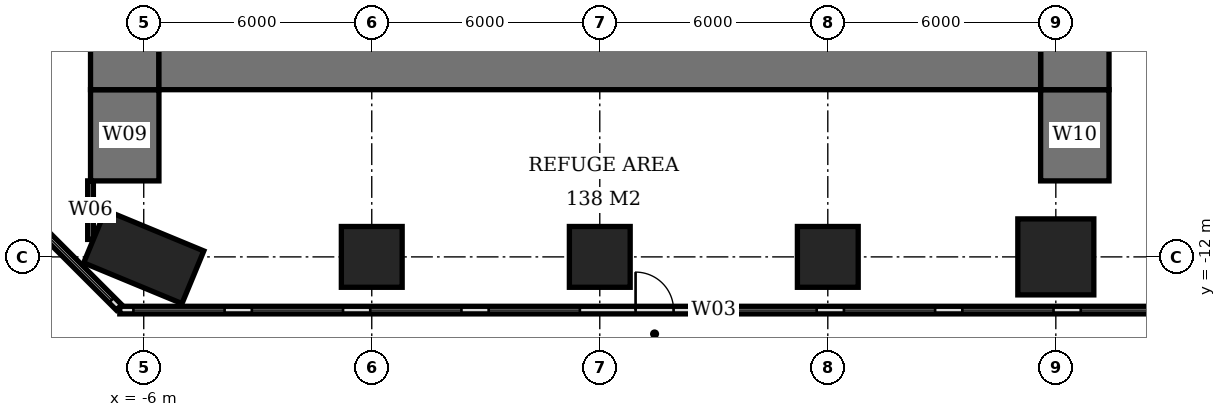
"""IFC4 building model, lengths in metres.
Left out: names, types, materials, properties, quantities, classifications, styles, units other than length and angle.
Written with IfcOpenShell. Run it as: python <this file> out.ifc"""

import sys

from ifc_helpers import new_model, si_unit, direction, frame, frame_2d, origin, origin_2d, place, context, subcontext, project, spatial, rectangle, extrude, element, fill, save


model = new_model("IFC4")
c1 = context("Model", 3, precision=1e-05, world=origin(), true_north=direction((0.0, 1.0)))
c2 = subcontext(c1, "Body", "Model", "MODEL_VIEW")
j1 = project(units=[si_unit("LENGTHUNIT", "METRE"), si_unit("PLANEANGLEUNIT", "RADIAN")], contexts=[c1])
p1 = place(None, origin())
s1 = spatial("IfcSite", under=j1, at=p1, CompositionType="ELEMENT")
p2 = place(p1, origin())
s2 = spatial("IfcBuilding", under=s1, at=p2, CompositionType="ELEMENT")
p3 = place(p2, frame((0.0, 0.0, 239.6)))
s3 = spatial("IfcBuildingStorey", under=s2, at=p3, CompositionType="ELEMENT", Elevation=239.6)
p4 = place(p3, frame((-6.0, -12.0, 0.0), z_axis=(0.0, 0.0, 1.0), x_axis=(-0.923879532511, 0.382683432365, 0.0)))
e1 = element("IfcColumn", 1, at=p4, inside=s3, PredefinedType="COLUMN", context=c2, shape_type="SweptSolid", body=[
    extrude(rectangle(XDim=2.8, YDim=1.5, at=origin_2d()), origin(), (0.0, 0.0, 1.0), 5.4),
])
for number, where, z_axis, x_axis in (
    (2, (0.0, -12.0, 0.0), (0.0, 0.0, 1.0), (1.0, 0.0, 0.0)),
    (3, (6.0, -12.0, 0.0), (0.0, 0.0, 1.0), (1.0, 0.0, 0.0)),
    (4, (12.0, -12.0, 0.0), (0.0, 0.0, 1.0), (1.0, 0.0, 0.0)),
):
    element("IfcColumn", number, at=place(p3, frame(where, z_axis=z_axis, x_axis=x_axis)), inside=s3, PredefinedType="COLUMN", context=c2, shape_type="SweptSolid", body=[
        extrude(rectangle(XDim=1.6, YDim=1.6, at=origin_2d()), origin(), (0.0, 0.0, 1.0), 5.4),
    ])
p5 = place(p3, frame((18.0, -12.0, 0.0), z_axis=(0.0, 0.0, 1.0), x_axis=(1.0, 0.0, 0.0)))
e5 = element("IfcColumn", 5, at=p5, inside=s3, PredefinedType="COLUMN", context=c2, shape_type="SweptSolid", body=[
    extrude(rectangle(XDim=2.0, YDim=2.0, at=origin_2d()), origin(), (0.0, 0.0, 1.0), 5.4),
])
p6 = place(p3, frame((-5.6, -6.6, 0.0), z_axis=(0.0, 0.0, 1.0), x_axis=(1.0, 0.0, 0.0)))
e6 = element("IfcWall", 6, at=p6, inside=s3, PredefinedType="SHEAR", context=c2, shape_type="SweptSolid", body=[
    extrude(rectangle(XDim=23.2, YDim=2.0, at=frame_2d((11.6, 0.0))), origin(), (0.0, 0.0, 1.0), 5.4),
])
p7 = place(p3, frame((-6.5, -7.6, 0.0), z_axis=(0.0, 0.0, 1.0), x_axis=(0.0, 1.0, 0.0)))
e7 = element("IfcWall", 7, at=p7, inside=s3, PredefinedType="SHEAR", context=c2, shape_type="SweptSolid", body=[
    extrude(rectangle(XDim=21.2, YDim=1.8, at=frame_2d((10.6, 0.0))), origin(), (0.0, 0.0, 1.0), 5.4),
])
p8 = place(p7, frame((7.8, 0.0, 0.0)))
e8 = element("IfcOpeningElement", 8, at=p8, cuts=e7, PredefinedType="OPENING", context=c2, shape_type="SweptSolid", body=[
    extrude(rectangle(XDim=1.8, YDim=2.4, at=frame_2d((0.9, 1.2))), frame((0.0, 0.91, 0.0), z_axis=(0.0, -1.0, 0.0), x_axis=(1.0, 0.0, 0.0)), (0.0, 0.0, 1.0), 1.82),
])
p9 = place(p3, frame((18.5, -7.6, 0.0), z_axis=(0.0, 0.0, 1.0), x_axis=(0.0, 1.0, 0.0)))
e9 = element("IfcWall", 9, at=p9, inside=s3, PredefinedType="SHEAR", context=c2, shape_type="SweptSolid", body=[
    extrude(rectangle(XDim=21.2, YDim=1.8, at=frame_2d((10.6, 0.0))), origin(), (0.0, 0.0, 1.0), 5.4),
])
p10 = place(p9, frame((9.2, 0.0, 0.0)))
e10 = element("IfcOpeningElement", 10, at=p10, cuts=e9, PredefinedType="OPENING", context=c2, shape_type="SweptSolid", body=[
    extrude(rectangle(XDim=1.8, YDim=2.4, at=frame_2d((0.9, 1.2))), frame((0.0, 0.91, 0.0), z_axis=(0.0, -1.0, 0.0), x_axis=(1.0, 0.0, 0.0)), (0.0, 0.0, 1.0), 1.82),
])
for number, where, z_axis, x_axis in (
    (11, (-6.5, -10.0, 0.0), (0.0, 0.0, 1.0), (0.0, 1.0, 0.0)),
    (12, (18.5, -10.0, 0.0), (0.0, 0.0, 1.0), (0.0, 1.0, 0.0)),
):
    element("IfcWall", number, at=place(p3, frame(where, z_axis=z_axis, x_axis=x_axis)), inside=s3, PredefinedType="SHEAR", context=c2, shape_type="SweptSolid", body=[
        extrude(rectangle(XDim=2.4, YDim=1.8, at=frame_2d((1.2, 0.0))), origin(), (0.0, 0.0, 1.0), 5.4),
    ])
p11 = place(p3, frame((-6.63, -13.4, 0.0), z_axis=(0.0, 0.0, 1.0), x_axis=(1.0, 0.0, 0.0)))
e13 = element("IfcWall", 13, at=p11, inside=s3, PredefinedType="USERDEFINED", context=c2, shape_type="SweptSolid", body=[
    extrude(rectangle(XDim=31.26, YDim=0.2, at=frame_2d((15.63, 0.0))), origin(), (0.0, 0.0, 1.0), 5.4),
])
p12 = place(p11, frame((0.358, 0.0, 0.6)))
e14 = element("IfcOpeningElement", 14, at=p12, cuts=e13, PredefinedType="OPENING", context=c2, shape_type="SweptSolid", body=[
    extrude(rectangle(XDim=2.4, YDim=3.0, at=frame_2d((1.2, 1.5))), frame((0.0, 0.11, 0.0), z_axis=(0.0, -1.0, 0.0), x_axis=(1.0, 0.0, 0.0)), (0.0, 0.0, 1.0), 0.22),
])
p13 = place(p11, frame((3.474, 0.0, 0.6)))
e15 = element("IfcOpeningElement", 15, at=p13, cuts=e13, PredefinedType="OPENING", context=c2, shape_type="SweptSolid", body=[
    extrude(rectangle(XDim=2.4, YDim=3.0, at=frame_2d((1.2, 1.5))), frame((0.0, 0.11, 0.0), z_axis=(0.0, -1.0, 0.0), x_axis=(1.0, 0.0, 0.0)), (0.0, 0.0, 1.0), 0.22),
])
p14 = place(p11, frame((6.59, 0.0, 0.6)))
e16 = element("IfcOpeningElement", 16, at=p14, cuts=e13, PredefinedType="OPENING", context=c2, shape_type="SweptSolid", body=[
    extrude(rectangle(XDim=2.4, YDim=3.0, at=frame_2d((1.2, 1.5))), frame((0.0, 0.11, 0.0), z_axis=(0.0, -1.0, 0.0), x_axis=(1.0, 0.0, 0.0)), (0.0, 0.0, 1.0), 0.22),
])
p15 = place(p11, frame((9.706, 0.0, 0.6)))
e17 = element("IfcOpeningElement", 17, at=p15, cuts=e13, PredefinedType="OPENING", context=c2, shape_type="SweptSolid", body=[
    extrude(rectangle(XDim=2.4, YDim=3.0, at=frame_2d((1.2, 1.5))), frame((0.0, 0.11, 0.0), z_axis=(0.0, -1.0, 0.0), x_axis=(1.0, 0.0, 0.0)), (0.0, 0.0, 1.0), 0.22),
])
p16 = place(p11, frame((13.572, 0.0, 0.0)))
e18 = element("IfcOpeningElement", 18, at=p16, cuts=e13, PredefinedType="OPENING", context=c2, shape_type="SweptSolid", body=[
    extrude(rectangle(XDim=1.0, YDim=2.1, at=frame_2d((0.5, 1.05))), frame((0.0, 0.11, 0.0), z_axis=(0.0, -1.0, 0.0), x_axis=(1.0, 0.0, 0.0)), (0.0, 0.0, 1.0), 0.22),
])
p17 = place(p11, frame((15.938, 0.0, 0.6)))
e19 = element("IfcOpeningElement", 19, at=p17, cuts=e13, PredefinedType="OPENING", context=c2, shape_type="SweptSolid", body=[
    extrude(rectangle(XDim=2.4, YDim=3.0, at=frame_2d((1.2, 1.5))), frame((0.0, 0.11, 0.0), z_axis=(0.0, -1.0, 0.0), x_axis=(1.0, 0.0, 0.0)), (0.0, 0.0, 1.0), 0.22),
])
p18 = place(p11, frame((19.054, 0.0, 0.6)))
e20 = element("IfcOpeningElement", 20, at=p18, cuts=e13, PredefinedType="OPENING", context=c2, shape_type="SweptSolid", body=[
    extrude(rectangle(XDim=2.4, YDim=3.0, at=frame_2d((1.2, 1.5))), frame((0.0, 0.11, 0.0), z_axis=(0.0, -1.0, 0.0), x_axis=(1.0, 0.0, 0.0)), (0.0, 0.0, 1.0), 0.22),
])
p19 = place(p11, frame((22.17, 0.0, 0.6)))
e21 = element("IfcOpeningElement", 21, at=p19, cuts=e13, PredefinedType="OPENING", context=c2, shape_type="SweptSolid", body=[
    extrude(rectangle(XDim=2.4, YDim=3.0, at=frame_2d((1.2, 1.5))), frame((0.0, 0.11, 0.0), z_axis=(0.0, -1.0, 0.0), x_axis=(1.0, 0.0, 0.0)), (0.0, 0.0, 1.0), 0.22),
])
p20 = place(p11, frame((25.286, 0.0, 0.6)))
e22 = element("IfcOpeningElement", 22, at=p20, cuts=e13, PredefinedType="OPENING", context=c2, shape_type="SweptSolid", body=[
    extrude(rectangle(XDim=2.4, YDim=3.0, at=frame_2d((1.2, 1.5))), frame((0.0, 0.11, 0.0), z_axis=(0.0, -1.0, 0.0), x_axis=(1.0, 0.0, 0.0)), (0.0, 0.0, 1.0), 0.22),
])
p21 = place(p11, frame((28.402, 0.0, 0.6)))
e23 = element("IfcOpeningElement", 23, at=p21, cuts=e13, PredefinedType="OPENING", context=c2, shape_type="SweptSolid", body=[
    extrude(rectangle(XDim=2.4, YDim=3.0, at=frame_2d((1.2, 1.5))), frame((0.0, 0.11, 0.0), z_axis=(0.0, -1.0, 0.0), x_axis=(1.0, 0.0, 0.0)), (0.0, 0.0, 1.0), 0.22),
])
p22 = place(p3, frame((-13.329, -6.651, 0.0), z_axis=(0.0, 0.0, 1.0), x_axis=(0.707106781187, -0.707106781187, 0.0)))
e24 = element("IfcWall", 24, at=p22, inside=s3, PredefinedType="USERDEFINED", context=c2, shape_type="SweptSolid", body=[
    extrude(rectangle(XDim=9.445, YDim=0.2, at=frame_2d((4.723, 0.0))), origin(), (0.0, 0.0, 1.0), 5.4),
])
p23 = place(p22, frame((0.274, 0.0, 0.6)))
e25 = element("IfcOpeningElement", 25, at=p23, cuts=e24, PredefinedType="OPENING", context=c2, shape_type="SweptSolid", body=[
    extrude(rectangle(XDim=2.6, YDim=3.0, at=frame_2d((1.3, 1.5))), frame((0.0, 0.11, 0.0), z_axis=(0.0, -1.0, 0.0), x_axis=(1.0, 0.0, 0.0)), (0.0, 0.0, 1.0), 0.22),
])
p24 = place(p22, frame((3.423, 0.0, 0.6)))
e26 = element("IfcOpeningElement", 26, at=p24, cuts=e24, PredefinedType="OPENING", context=c2, shape_type="SweptSolid", body=[
    extrude(rectangle(XDim=2.6, YDim=3.0, at=frame_2d((1.3, 1.5))), frame((0.0, 0.11, 0.0), z_axis=(0.0, -1.0, 0.0), x_axis=(1.0, 0.0, 0.0)), (0.0, 0.0, 1.0), 0.22),
])
p25 = place(p22, frame((6.571, 0.0, 0.6)))
e27 = element("IfcOpeningElement", 27, at=p25, cuts=e24, PredefinedType="OPENING", context=c2, shape_type="SweptSolid", body=[
    extrude(rectangle(XDim=2.6, YDim=3.0, at=frame_2d((1.3, 1.5))), frame((0.0, 0.11, 0.0), z_axis=(0.0, -1.0, 0.0), x_axis=(1.0, 0.0, 0.0)), (0.0, 0.0, 1.0), 0.22),
])
p26 = place(p3, frame((-7.4, -11.541, 0.0), z_axis=(0.0, 0.0, 1.0), x_axis=(0.0, 1.0, 0.0)))
e28 = element("IfcWall", 28, at=p26, inside=s3, PredefinedType="PARTITIONING", context=c2, shape_type="SweptSolid", body=[
    extrude(rectangle(XDim=1.541, YDim=0.15, at=frame_2d((0.77, 0.0))), origin(), (0.0, 0.0, 1.0), 5.15),
])
p27 = place(p12, origin())
e29 = element("IfcWindow", 29, at=p27, inside=s3, PartitioningType="SINGLE_PANEL", PredefinedType="USERDEFINED", context=c2, shape_type="SweptSolid", body=[
    extrude(rectangle(XDim=2.4, YDim=3.0, at=frame_2d((1.2, 1.5))), frame((0.0, 0.03, 0.0), z_axis=(0.0, -1.0, 0.0), x_axis=(1.0, 0.0, 0.0)), (0.0, 0.0, 1.0), 0.06),
])
fill(e14, e29)
p28 = place(p13, origin())
e30 = element("IfcWindow", 30, at=p28, inside=s3, PartitioningType="SINGLE_PANEL", PredefinedType="USERDEFINED", context=c2, shape_type="SweptSolid", body=[
    extrude(rectangle(XDim=2.4, YDim=3.0, at=frame_2d((1.2, 1.5))), frame((0.0, 0.03, 0.0), z_axis=(0.0, -1.0, 0.0), x_axis=(1.0, 0.0, 0.0)), (0.0, 0.0, 1.0), 0.06),
])
fill(e15, e30)
p29 = place(p14, origin())
e31 = element("IfcWindow", 31, at=p29, inside=s3, PartitioningType="SINGLE_PANEL", PredefinedType="USERDEFINED", context=c2, shape_type="SweptSolid", body=[
    extrude(rectangle(XDim=2.4, YDim=3.0, at=frame_2d((1.2, 1.5))), frame((0.0, 0.03, 0.0), z_axis=(0.0, -1.0, 0.0), x_axis=(1.0, 0.0, 0.0)), (0.0, 0.0, 1.0), 0.06),
])
fill(e16, e31)
p30 = place(p15, origin())
e32 = element("IfcWindow", 32, at=p30, inside=s3, PartitioningType="SINGLE_PANEL", PredefinedType="USERDEFINED", context=c2, shape_type="SweptSolid", body=[
    extrude(rectangle(XDim=2.4, YDim=3.0, at=frame_2d((1.2, 1.5))), frame((0.0, 0.03, 0.0), z_axis=(0.0, -1.0, 0.0), x_axis=(1.0, 0.0, 0.0)), (0.0, 0.0, 1.0), 0.06),
])
fill(e17, e32)
p31 = place(p16, origin())
e33 = element("IfcDoor", 33, at=p31, inside=s3, OperationType="SINGLE_SWING_LEFT", PredefinedType="DOOR", context=c2, shape_type="SweptSolid", body=[
    extrude(rectangle(XDim=1.0, YDim=2.1, at=frame_2d((0.5, 1.05))), frame((0.0, 0.025, 0.0), z_axis=(0.0, -1.0, 0.0), x_axis=(1.0, 0.0, 0.0)), (0.0, 0.0, 1.0), 0.05),
])
fill(e18, e33)
p32 = place(p17, origin())
e34 = element("IfcWindow", 34, at=p32, inside=s3, PartitioningType="SINGLE_PANEL", PredefinedType="USERDEFINED", context=c2, shape_type="SweptSolid", body=[
    extrude(rectangle(XDim=2.4, YDim=3.0, at=frame_2d((1.2, 1.5))), frame((0.0, 0.03, 0.0), z_axis=(0.0, -1.0, 0.0), x_axis=(1.0, 0.0, 0.0)), (0.0, 0.0, 1.0), 0.06),
])
fill(e19, e34)
p33 = place(p18, origin())
e35 = element("IfcWindow", 35, at=p33, inside=s3, PartitioningType="SINGLE_PANEL", PredefinedType="USERDEFINED", context=c2, shape_type="SweptSolid", body=[
    extrude(rectangle(XDim=2.4, YDim=3.0, at=frame_2d((1.2, 1.5))), frame((0.0, 0.03, 0.0), z_axis=(0.0, -1.0, 0.0), x_axis=(1.0, 0.0, 0.0)), (0.0, 0.0, 1.0), 0.06),
])
fill(e20, e35)
p34 = place(p19, origin())
e36 = element("IfcWindow", 36, at=p34, inside=s3, PartitioningType="SINGLE_PANEL", PredefinedType="USERDEFINED", context=c2, shape_type="SweptSolid", body=[
    extrude(rectangle(XDim=2.4, YDim=3.0, at=frame_2d((1.2, 1.5))), frame((0.0, 0.03, 0.0), z_axis=(0.0, -1.0, 0.0), x_axis=(1.0, 0.0, 0.0)), (0.0, 0.0, 1.0), 0.06),
])
fill(e21, e36)
p35 = place(p20, origin())
e37 = element("IfcWindow", 37, at=p35, inside=s3, PartitioningType="SINGLE_PANEL", PredefinedType="USERDEFINED", context=c2, shape_type="SweptSolid", body=[
    extrude(rectangle(XDim=2.4, YDim=3.0, at=frame_2d((1.2, 1.5))), frame((0.0, 0.03, 0.0), z_axis=(0.0, -1.0, 0.0), x_axis=(1.0, 0.0, 0.0)), (0.0, 0.0, 1.0), 0.06),
])
fill(e22, e37)
p36 = place(p25, origin())
e38 = element("IfcWindow", 38, at=p36, inside=s3, PartitioningType="SINGLE_PANEL", PredefinedType="USERDEFINED", context=c2, shape_type="SweptSolid", body=[
    extrude(rectangle(XDim=2.6, YDim=3.0, at=frame_2d((1.3, 1.5))), frame((0.0, 0.03, 0.0), z_axis=(0.0, -1.0, 0.0), x_axis=(1.0, 0.0, 0.0)), (0.0, 0.0, 1.0), 0.06),
])
fill(e27, e38)
save(model, sys.argv[1])
